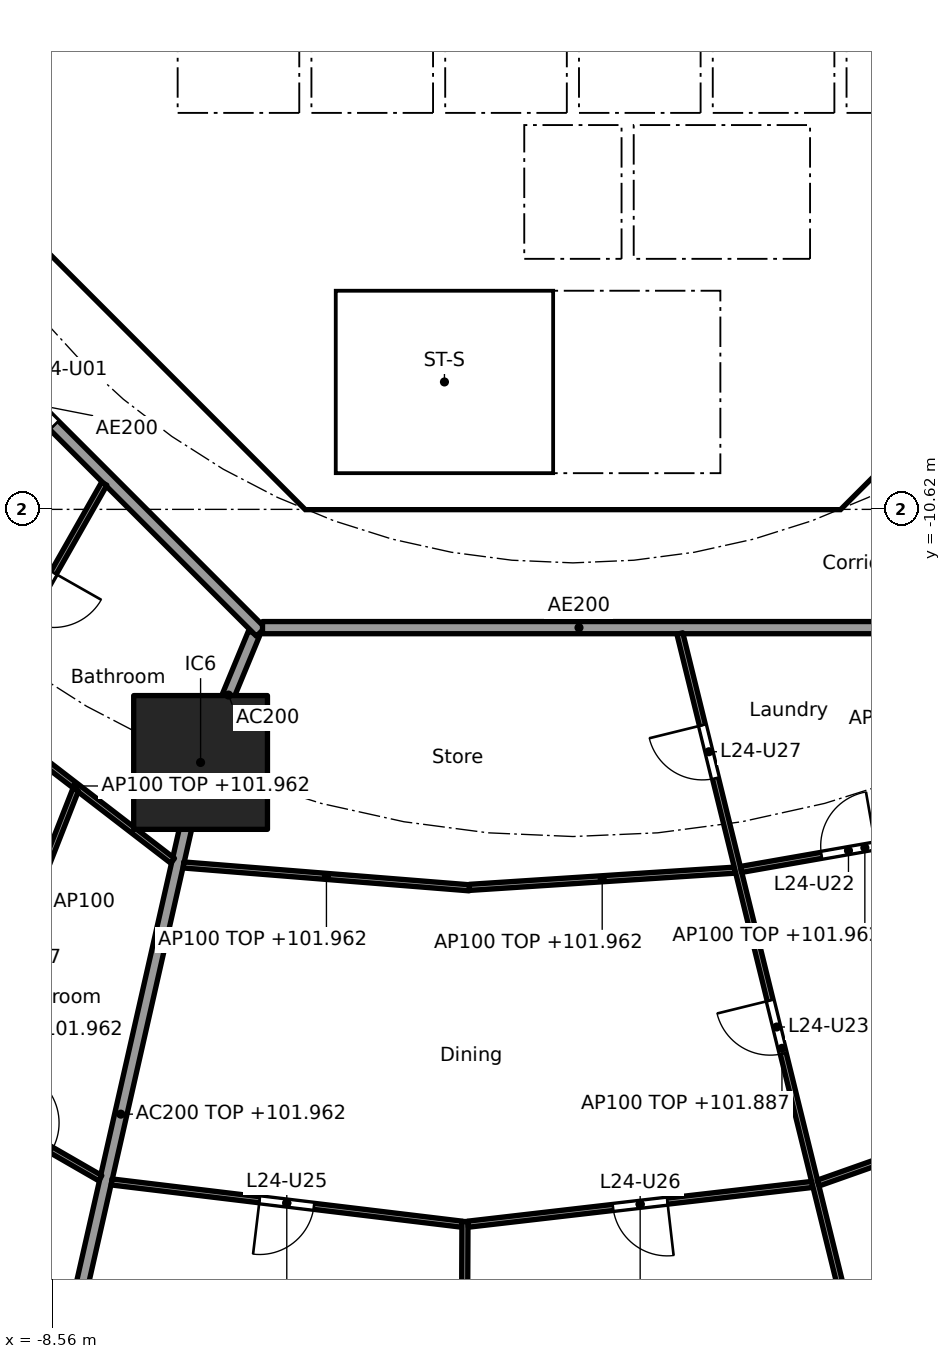
"""IFC4 building model, lengths in metres.
Left out: names, types, materials, properties, quantities, classifications, styles, units other than length and angle.
Written with IfcOpenShell. Run it as: python <this file> out.ifc"""

import sys

from ifc_helpers import new_model, si_unit, direction, frame, frame_2d, origin, origin_2d, place, context, subcontext, project, spatial, polyline, rectangle, outline, extrude, element, fill, save


model = new_model("IFC4")
c1 = context("Model", 3, precision=1e-05, world=origin(), true_north=direction((0.0, 1.0)))
c2 = subcontext(c1, "Body", "Model", "MODEL_VIEW")
j1 = project(units=[si_unit("LENGTHUNIT", "METRE"), si_unit("PLANEANGLEUNIT", "RADIAN")], contexts=[c1])
p1 = place(None, origin())
s1 = spatial("IfcSite", under=j1, at=p1, CompositionType="ELEMENT")
p2 = place(p1, origin())
s2 = spatial("IfcBuilding", under=s1, at=p2, CompositionType="ELEMENT")
p3 = place(p2, frame((0.0, 0.0, 99.2)))
s3 = spatial("IfcBuildingStorey", under=s2, at=p3, CompositionType="ELEMENT", Elevation=99.2)
p4 = place(p3, frame((-6.123, -14.782, 0.0), z_axis=(0.0, 0.0, 1.0), x_axis=(1.0, 0.0, 0.0)))
e1 = element("IfcColumn", 1, at=p4, inside=s3, PredefinedType="COLUMN", context=c2, shape_type="SweptSolid", body=[
    extrude(rectangle(XDim=2.2, YDim=2.2, at=origin_2d()), origin(), (0.0, 0.0, 1.0), 3.7),
])
p5 = place(p3, frame((-9.988, -4.613, 0.0), z_axis=(0.0, 0.0, 1.0), x_axis=(0.707106781187, -0.707106781187, 0.0)))
e2 = element("IfcWall", 2, at=p5, inside=s3, PredefinedType="SHEAR", context=c2, shape_type="SweptSolid", body=[
    extrude(rectangle(XDim=7.602, YDim=0.6, at=frame_2d((3.801, 0.0))), origin(), (0.0, 0.0, 1.0), 3.44),
])
p6 = place(p5, frame((6.151, 0.0, 0.0)))
e3 = element("IfcOpeningElement", 3, at=p6, cuts=e2, PredefinedType="OPENING", context=c2, shape_type="SweptSolid", body=[
    extrude(rectangle(XDim=1.1, YDim=2.1, at=frame_2d((0.55, 1.05))), frame((0.0, 0.31, 0.0), z_axis=(0.0, -1.0, 0.0), x_axis=(1.0, 0.0, 0.0)), (0.0, 0.0, 1.0), 0.62),
])
p7 = place(p3, frame((4.613, -9.988, 0.0), z_axis=(0.0, 0.0, 1.0), x_axis=(0.707106781187, 0.707106781187, 0.0)))
e4 = element("IfcWall", 4, at=p7, inside=s3, PredefinedType="SHEAR", context=c2, shape_type="SweptSolid", body=[
    extrude(rectangle(XDim=7.602, YDim=0.6, at=frame_2d((3.801, 0.0))), origin(), (0.0, 0.0, 1.0), 3.44),
])
p8 = place(p7, frame((3.201, 0.0, 0.0)))
e5 = element("IfcOpeningElement", 5, at=p8, cuts=e4, PredefinedType="OPENING", context=c2, shape_type="SweptSolid", body=[
    extrude(rectangle(XDim=1.2, YDim=2.1, at=frame_2d((0.6, 1.05))), frame((0.0, 0.31, 0.0), z_axis=(0.0, -1.0, 0.0), x_axis=(1.0, 0.0, 0.0)), (0.0, 0.0, 1.0), 0.62),
])
p9 = place(p3, frame((4.0, -10.025, 0.0), z_axis=(0.0, 0.0, 1.0), x_axis=(0.0, 1.0, 0.0)))
e6 = element("IfcWall", 6, at=p9, inside=s3, PredefinedType="SOLIDWALL", context=c2, shape_type="SweptSolid", body=[
    extrude(rectangle(XDim=3.0, YDim=0.2, at=frame_2d((1.5, 0.0))), origin(), (0.0, 0.0, 1.0), 3.44),
])
p10 = place(p9, frame((0.975, 0.0, 0.0)))
e7 = element("IfcOpeningElement", 7, at=p10, cuts=e6, PredefinedType="OPENING", context=c2, shape_type="SweptSolid", body=[
    extrude(rectangle(XDim=1.1, YDim=2.1, at=frame_2d((0.55, 1.05))), frame((0.0, 0.11, 0.0), z_axis=(0.0, -1.0, 0.0), x_axis=(1.0, 0.0, 0.0)), (0.0, 0.0, 1.0), 0.22),
])
p11 = place(p3, frame((-7.4, -6.627, 0.0), z_axis=(0.0, 0.0, 1.0), x_axis=(0.0, 1.0, 0.0)))
e8 = element("IfcWall", 8, at=p11, inside=s3, PredefinedType="PARTITIONING", context=c2, shape_type="SweptSolid", body=[
    extrude(rectangle(XDim=2.527, YDim=0.15, at=frame_2d((1.263, 0.0))), origin(), (0.0, 0.0, 1.0), 3.44),
])
p12 = place(p11, frame((0.776, 0.0, 0.0)))
e9 = element("IfcOpeningElement", 9, at=p12, cuts=e8, PredefinedType="OPENING", context=c2, shape_type="SweptSolid", body=[
    extrude(rectangle(XDim=0.9, YDim=2.1, at=frame_2d((0.45, 1.05))), frame((0.0, 0.085, 0.0), z_axis=(0.0, -1.0, 0.0), x_axis=(1.0, 0.0, 0.0)), (0.0, 0.0, 1.0), 0.17),
])
p13 = place(p3, frame((4.0, -6.5, 0.0), z_axis=(0.0, 0.0, 1.0), x_axis=(0.0, 1.0, 0.0)))
e10 = element("IfcWall", 10, at=p13, inside=s3, PredefinedType="SOLIDWALL", context=c2, shape_type="SweptSolid", body=[
    extrude(rectangle(XDim=2.2, YDim=0.2, at=frame_2d((1.1, 0.0))), origin(), (0.0, 0.0, 1.0), 3.44),
])
p14 = place(p13, frame((0.55, 0.0, 0.0)))
e11 = element("IfcOpeningElement", 11, at=p14, cuts=e10, PredefinedType="OPENING", context=c2, shape_type="SweptSolid", body=[
    extrude(rectangle(XDim=1.1, YDim=2.1, at=frame_2d((0.55, 1.05))), frame((0.0, 0.11, 0.0), z_axis=(0.0, -1.0, 0.0), x_axis=(1.0, 0.0, 0.0)), (0.0, 0.0, 1.0), 0.22),
])
p15 = place(p3, frame((-4.0, -6.5, 0.0), z_axis=(0.0, 0.0, 1.0), x_axis=(0.0, 1.0, 0.0)))
e12 = element("IfcWall", 12, at=p15, inside=s3, PredefinedType="SOLIDWALL", context=c2, shape_type="SweptSolid", body=[
    extrude(rectangle(XDim=2.2, YDim=0.2, at=frame_2d((1.1, 0.0))), origin(), (0.0, 0.0, 1.0), 3.44),
])
p16 = place(p15, frame((0.65, 0.0, 0.0)))
e13 = element("IfcOpeningElement", 13, at=p16, cuts=e12, PredefinedType="OPENING", context=c2, shape_type="SweptSolid", body=[
    extrude(rectangle(XDim=0.9, YDim=2.1, at=frame_2d((0.45, 1.05))), frame((0.0, 0.11, 0.0), z_axis=(0.0, -1.0, 0.0), x_axis=(1.0, 0.0, 0.0)), (0.0, 0.0, 1.0), 0.22),
])
p17 = place(p3, origin())
e14 = element("IfcWall", 14, at=p17, inside=s3, PredefinedType="SHEAR", context=c2, shape_type="SweptSolid", body=[
    extrude(outline(polyline([(-4.152, -10.025), (4.152, -10.025), (4.401, -9.776), (4.825, -10.2), (4.401, -10.625), (-4.401, -10.625), (-4.825, -10.2), (-4.401, -9.776), (-4.152, -10.025)])), origin(), (0.0, 0.0, 1.0), 3.44),
])
for number, where, z_axis, x_axis in (
    (15, (-0.9, -6.5, 0.0), (0.0, 0.0, 1.0), (0.0, 1.0, 0.0)),
    (16, (0.9, -6.5, 0.0), (0.0, 0.0, 1.0), (0.0, 1.0, 0.0)),
):
    element("IfcWall", number, at=place(p3, frame(where, z_axis=z_axis, x_axis=x_axis)), inside=s3, PredefinedType="SOLIDWALL", context=c2, shape_type="SweptSolid", body=[
        extrude(rectangle(XDim=2.2, YDim=0.2, at=frame_2d((1.1, 0.0))), origin(), (0.0, 0.0, 1.0), 3.44),
    ])
p18 = place(p3, origin())
e17 = element("IfcWall", 17, at=p18, inside=s3, PredefinedType="SOLIDWALL", context=c2, shape_type="SweptSolid", body=[
    extrude(outline(polyline([(-6.7, -2.1), (-6.5, -2.1), (-6.5, -4.1), (-4.5, -4.1), (-4.5, -2.1), (-4.3, -2.1), (-4.3, -4.1), (-2.3, -4.1), (-2.3, -2.1), (-2.1, -2.1), (-2.1, -4.1), (-0.1, -4.1), (-0.1, -2.1), (0.1, -2.1), (0.1, -4.1), (2.1, -4.1), (2.1, -2.1), (2.3, -2.1), (2.3, -4.1), (4.3, -4.1), (4.3, -2.1), (4.5, -2.1), (4.5, -4.1), (6.5, -4.1), (6.5, -2.1), (6.7, -2.1), (6.7, -4.3), (-6.7, -4.3), (-6.7, -2.1)])), origin(), (0.0, 0.0, 1.0), 3.44),
])
p19 = place(p3, frame((-10.025, -4.0, 0.0), z_axis=(0.0, 0.0, 1.0), x_axis=(1.0, 0.0, 0.0)))
e18 = element("IfcWall", 18, at=p19, inside=s3, PredefinedType="PARTITIONING", context=c2, shape_type="SweptSolid", body=[
    extrude(rectangle(XDim=3.325, YDim=0.2, at=frame_2d((1.662, 0.0))), origin(), (0.0, 0.0, 1.0), 3.44),
])
p20 = place(p3, origin())
e19 = element("IfcWall", 19, at=p20, inside=s3, PredefinedType="SOLIDWALL", context=c2, shape_type="SweptSolid", body=[
    extrude(outline(polyline([(-3.9, -10.025), (-4.1, -10.025), (-4.1, -7.025), (-3.9, -7.025), (-3.9, -10.025)])), origin(), (0.0, 0.0, 1.0), 3.44),
])
p21 = place(p3, origin())
e20 = element("IfcWall", 20, at=p21, inside=s3, PredefinedType="SOLIDWALL", context=c2, shape_type="SweptSolid", body=[
    extrude(outline(polyline([(4.1, -7.025), (-4.1, -7.025), (-4.1, -6.5), (4.1, -6.5), (4.1, -7.025)])), origin(), (0.0, 0.0, 1.0), 3.44),
])
p22 = place(p3, frame((-5.243, -12.657, 0.0), z_axis=(0.0, 0.0, 1.0), x_axis=(-0.382668627144, -0.923885664896, 0.0)))
e21 = element("IfcWall", 21, at=p22, inside=s3, PredefinedType="PARTITIONING", context=c2, shape_type="SweptSolid", body=[
    extrude(rectangle(XDim=2.2, YDim=0.2, at=frame_2d((1.1, 0.0))), origin(), (0.0, 0.0, 1.0), 3.44),
])
p23 = place(p3, frame((-6.134, -14.831, 0.0), z_axis=(0.0, 0.0, 1.0), x_axis=(-0.221225405869, -0.975222702667, 0.0)))
e22 = element("IfcWall", 22, at=p23, inside=s3, PredefinedType="PARTITIONING", context=c2, shape_type="SweptSolid", body=[
    extrude(rectangle(XDim=11.761, YDim=0.2, at=frame_2d((5.88, 0.0))), origin(), (0.0, 0.0, 1.0), 2.762),
])
p24 = place(p3, frame((-12.635, -5.134, 0.0), z_axis=(0.0, 0.0, 1.0), x_axis=(0.707106781187, -0.707106781187, 0.0)))
e23 = element("IfcWall", 23, at=p24, inside=s3, PredefinedType="PARTITIONING", context=c2, shape_type="SweptSolid", body=[
    extrude(rectangle(XDim=10.609, YDim=0.2, at=frame_2d((5.305, 0.0))), origin(), (0.0, 0.0, 1.0), 3.44),
])
p25 = place(p24, frame((4.804, 0.0, 0.0)))
e24 = element("IfcOpeningElement", 24, at=p25, cuts=e23, PredefinedType="OPENING", context=c2, shape_type="SweptSolid", body=[
    extrude(rectangle(XDim=1.0, YDim=2.1, at=frame_2d((0.5, 1.05))), frame((0.0, 0.11, 0.0), z_axis=(0.0, -1.0, 0.0), x_axis=(1.0, 0.0, 0.0)), (0.0, 0.0, 1.0), 0.22),
])
p26 = place(p3, frame((-5.104, -12.565, 0.0), z_axis=(0.0, 0.0, 1.0), x_axis=(1.0, 0.0, 0.0)))
e25 = element("IfcWall", 25, at=p26, inside=s3, PredefinedType="PARTITIONING", context=c2, shape_type="SweptSolid", body=[
    extrude(rectangle(XDim=10.409, YDim=0.2, at=frame_2d((5.205, 0.0))), origin(), (0.0, 0.0, 1.0), 3.44),
])
p27 = place(p3, frame((-7.707, -10.198, 0.0), z_axis=(0.0, 0.0, 1.0), x_axis=(-0.49395524734, -0.869487328042, 0.0)))
e26 = element("IfcWall", 26, at=p27, inside=s3, PredefinedType="PARTITIONING", context=c2, shape_type="SweptSolid", body=[
    extrude(rectangle(XDim=15.025, YDim=0.1, at=frame_2d((7.512, 0.0))), origin(), (0.0, 0.0, 1.0), 2.687),
])
p28 = place(p27, frame((1.684, 0.0, 0.0)))
e27 = element("IfcOpeningElement", 27, at=p28, cuts=e26, PredefinedType="OPENING", context=c2, shape_type="SweptSolid", body=[
    extrude(rectangle(XDim=0.9, YDim=2.1, at=frame_2d((0.45, 1.05))), frame((0.0, 0.06, 0.0), z_axis=(0.0, -1.0, 0.0), x_axis=(1.0, 0.0, 0.0)), (0.0, 0.0, 1.0), 0.12),
])
p29 = place(p27, frame((6.648, 0.0, 0.0)))
e28 = element("IfcOpeningElement", 28, at=p29, cuts=e26, PredefinedType="OPENING", context=c2, shape_type="SweptSolid", body=[
    extrude(rectangle(XDim=0.9, YDim=2.1, at=frame_2d((0.45, 1.05))), frame((0.0, 0.06, 0.0), z_axis=(0.0, -1.0, 0.0), x_axis=(1.0, 0.0, 0.0)), (0.0, 0.0, 1.0), 0.12),
])
p30 = place(p27, frame((12.027, 0.0, 0.0)))
e29 = element("IfcOpeningElement", 29, at=p30, cuts=e26, PredefinedType="OPENING", context=c2, shape_type="SweptSolid", body=[
    extrude(rectangle(XDim=0.9, YDim=2.1, at=frame_2d((0.45, 1.05))), frame((0.0, 0.06, 0.0), z_axis=(0.0, -1.0, 0.0), x_axis=(1.0, 0.0, 0.0)), (0.0, 0.0, 1.0), 0.12),
])
p31 = place(p3, frame((-9.775, -13.939, 0.0), z_axis=(0.0, 0.0, 1.0), x_axis=(0.792162117554, -0.610310723741, 0.0)))
e30 = element("IfcWall", 30, at=p31, inside=s3, PredefinedType="PARTITIONING", context=c2, shape_type="SweptSolid", body=[
    extrude(rectangle(XDim=4.03, YDim=0.1, at=frame_2d((2.015, 0.0))), origin(), (0.0, 0.0, 1.0), 2.762),
])
p32 = place(p3, frame((-12.568, -18.856, 0.0), z_axis=(0.0, 0.0, 1.0), x_axis=(0.866533437451, -0.499119025664, 0.0)))
e31 = element("IfcWall", 31, at=p32, inside=s3, PredefinedType="PARTITIONING", context=c2, shape_type="SweptSolid", body=[
    extrude(rectangle(XDim=5.535, YDim=0.1, at=frame_2d((2.768, 0.0))), origin(), (0.0, 0.0, 1.0), 2.762),
])
p33 = place(p32, frame((3.714, 0.0, 0.0)))
e32 = element("IfcOpeningElement", 32, at=p33, cuts=e31, PredefinedType="OPENING", context=c2, shape_type="SweptSolid", body=[
    extrude(rectangle(XDim=0.9, YDim=2.1, at=frame_2d((0.45, 1.05))), frame((0.0, 0.06, 0.0), z_axis=(0.0, -1.0, 0.0), x_axis=(1.0, 0.0, 0.0)), (0.0, 0.0, 1.0), 0.12),
])
p34 = place(p3, frame((-8.177, -15.231, 0.0), z_axis=(0.0, 0.0, 1.0), x_axis=(-0.365520869553, -0.930803144559, 0.0)))
e33 = element("IfcWall", 33, at=p34, inside=s3, PredefinedType="PARTITIONING", context=c2, shape_type="SweptSolid", body=[
    extrude(rectangle(XDim=5.342, YDim=0.1, at=frame_2d((2.671, 0.0))), origin(), (0.0, 0.0, 1.0), 3.44),
])
p35 = place(p3, frame((-6.404, -16.468, 0.0), z_axis=(0.0, 0.0, 1.0), x_axis=(0.996817253426, -0.079720532316, 0.0)))
e34 = element("IfcWall", 34, at=p35, inside=s3, PredefinedType="PARTITIONING", context=c2, shape_type="SweptSolid", body=[
    extrude(rectangle(XDim=4.716, YDim=0.1, at=frame_2d((2.358, 0.0))), origin(), (0.0, 0.0, 1.0), 2.762),
])
p36 = place(p3, frame((-7.586, -21.68, 0.0), z_axis=(0.0, 0.0, 1.0), x_axis=(0.992810189026, -0.119699325668, 0.0)))
e35 = element("IfcWall", 35, at=p36, inside=s3, PredefinedType="PARTITIONING", context=c2, shape_type="SweptSolid", body=[
    extrude(rectangle(XDim=5.803, YDim=0.1, at=frame_2d((2.901, 0.0))), origin(), (0.0, 0.0, 1.0), 2.762),
])
p37 = place(p36, frame((2.451, 0.0, 0.0)))
e36 = element("IfcOpeningElement", 36, at=p37, cuts=e35, PredefinedType="OPENING", context=c2, shape_type="SweptSolid", body=[
    extrude(rectangle(XDim=0.9, YDim=2.1, at=frame_2d((0.45, 1.05))), frame((0.0, 0.06, 0.0), z_axis=(0.0, -1.0, 0.0), x_axis=(1.0, 0.0, 0.0)), (0.0, 0.0, 1.0), 0.12),
])
p38 = place(p3, frame((-1.703, -16.836, 0.0), z_axis=(0.0, 0.0, 1.0), x_axis=(0.997897941075, 0.064805086209, 0.0)))
e37 = element("IfcWall", 37, at=p38, inside=s3, PredefinedType="PARTITIONING", context=c2, shape_type="SweptSolid", body=[
    extrude(rectangle(XDim=4.378, YDim=0.1, at=frame_2d((2.189, 0.0))), origin(), (0.0, 0.0, 1.0), 2.762),
])
p39 = place(p3, frame((-1.775, -22.331, 0.0), z_axis=(0.0, 0.0, 1.0), x_axis=(-0.004088153894, -0.999991643464, 0.0)))
e38 = element("IfcWall", 38, at=p39, inside=s3, PredefinedType="PARTITIONING", context=c2, shape_type="SweptSolid", body=[
    extrude(rectangle(XDim=5.016, YDim=0.1, at=frame_2d((2.508, 0.0))), origin(), (0.0, 0.0, 1.0), 2.762),
])
p40 = place(p3, frame((-1.726, -22.375, 0.0), z_axis=(0.0, 0.0, 1.0), x_axis=(0.99339223329, 0.114768771187, 0.0)))
e39 = element("IfcWall", 39, at=p40, inside=s3, PredefinedType="PARTITIONING", context=c2, shape_type="SweptSolid", body=[
    extrude(rectangle(XDim=5.701, YDim=0.1, at=frame_2d((2.851, 0.0))), origin(), (0.0, 0.0, 1.0), 2.762),
])
p41 = place(p40, frame((2.4, 0.0, 0.0)))
e40 = element("IfcOpeningElement", 40, at=p41, cuts=e39, PredefinedType="OPENING", context=c2, shape_type="SweptSolid", body=[
    extrude(rectangle(XDim=0.9, YDim=2.1, at=frame_2d((0.45, 1.05))), frame((0.0, 0.06, 0.0), z_axis=(0.0, -1.0, 0.0), x_axis=(1.0, 0.0, 0.0)), (0.0, 0.0, 1.0), 0.12),
])
p42 = place(p3, frame((1.759, -12.662, 0.0), z_axis=(0.0, 0.0, 1.0), x_axis=(0.239021819854, -0.971014196412, 0.0)))
e41 = element("IfcWall", 41, at=p42, inside=s3, PredefinedType="PARTITIONING", context=c2, shape_type="SweptSolid", body=[
    extrude(rectangle(XDim=14.05, YDim=0.1, at=frame_2d((7.025, 0.0))), origin(), (0.0, 0.0, 1.0), 2.687),
])
p43 = place(p42, frame((6.214, 0.0, 0.0)))
e42 = element("IfcOpeningElement", 42, at=p43, cuts=e41, PredefinedType="OPENING", context=c2, shape_type="SweptSolid", body=[
    extrude(rectangle(XDim=0.9, YDim=2.1, at=frame_2d((0.45, 1.05))), frame((0.0, 0.06, 0.0), z_axis=(0.0, -1.0, 0.0), x_axis=(1.0, 0.0, 0.0)), (0.0, 0.0, 1.0), 0.12),
])
p44 = place(p42, frame((1.552, 0.0, 0.0)))
e43 = element("IfcOpeningElement", 43, at=p44, cuts=e41, PredefinedType="OPENING", context=c2, shape_type="SweptSolid", body=[
    extrude(rectangle(XDim=0.9, YDim=2.1, at=frame_2d((0.45, 1.05))), frame((0.0, 0.06, 0.0), z_axis=(0.0, -1.0, 0.0), x_axis=(1.0, 0.0, 0.0)), (0.0, 0.0, 1.0), 0.12),
])
p45 = place(p3, frame((2.765, -16.541, 0.0), z_axis=(0.0, 0.0, 1.0), x_axis=(0.984998612286, 0.172562260633, 0.0)))
e44 = element("IfcWall", 44, at=p45, inside=s3, PredefinedType="PARTITIONING", context=c2, shape_type="SweptSolid", body=[
    extrude(rectangle(XDim=4.134, YDim=0.1, at=frame_2d((2.067, 0.0))), origin(), (0.0, 0.0, 1.0), 2.762),
])
p46 = place(p45, frame((1.344, 0.0, 0.0)))
e45 = element("IfcOpeningElement", 45, at=p46, cuts=e44, PredefinedType="OPENING", context=c2, shape_type="SweptSolid", body=[
    extrude(rectangle(XDim=0.9, YDim=2.1, at=frame_2d((0.45, 1.05))), frame((0.0, 0.06, 0.0), z_axis=(0.0, -1.0, 0.0), x_axis=(1.0, 0.0, 0.0)), (0.0, 0.0, 1.0), 0.12),
])
p47 = place(p3, frame((4.034, -21.698, 0.0), z_axis=(0.0, 0.0, 1.0), x_axis=(0.942864271692, 0.333177077794, 0.0)))
e46 = element("IfcWall", 46, at=p47, inside=s3, PredefinedType="PARTITIONING", context=c2, shape_type="SweptSolid", body=[
    extrude(rectangle(XDim=5.545, YDim=0.1, at=frame_2d((2.772, 0.0))), origin(), (0.0, 0.0, 1.0), 2.762),
])
p48 = place(p14, origin())
e47 = element("IfcDoor", 47, at=p48, inside=s3, OperationType="DOUBLE_DOOR_SLIDING", PredefinedType="DOOR", context=c2, shape_type="SweptSolid", body=[
    extrude(rectangle(XDim=1.1, YDim=2.1, at=frame_2d((0.55, 1.05))), frame((0.0, 0.025, 0.0), z_axis=(0.0, -1.0, 0.0), x_axis=(1.0, 0.0, 0.0)), (0.0, 0.0, 1.0), 0.05),
])
fill(e11, e47)
p49 = place(p10, origin())
e48 = element("IfcDoor", 48, at=p49, inside=s3, OperationType="SINGLE_SWING_LEFT", PredefinedType="DOOR", context=c2, shape_type="SweptSolid", body=[
    extrude(rectangle(XDim=1.1, YDim=2.1, at=frame_2d((0.55, 1.05))), frame((0.0, 0.025, 0.0), z_axis=(0.0, -1.0, 0.0), x_axis=(1.0, 0.0, 0.0)), (0.0, 0.0, 1.0), 0.05),
])
fill(e7, e48)
p50 = place(p12, origin())
e49 = element("IfcDoor", 49, at=p50, inside=s3, OperationType="SINGLE_SWING_LEFT", PredefinedType="DOOR", context=c2, shape_type="SweptSolid", body=[
    extrude(rectangle(XDim=0.9, YDim=2.1, at=frame_2d((0.45, 1.05))), frame((0.0, 0.025, 0.0), z_axis=(0.0, -1.0, 0.0), x_axis=(1.0, 0.0, 0.0)), (0.0, 0.0, 1.0), 0.05),
])
fill(e9, e49)
p51 = place(p16, frame((0.9, 0.0, 0.0), x_axis=(-1.0, 0.0, 0.0)))
e50 = element("IfcDoor", 50, at=p51, inside=s3, OperationType="SINGLE_SWING_LEFT", PredefinedType="DOOR", context=c2, shape_type="SweptSolid", body=[
    extrude(rectangle(XDim=0.9, YDim=2.1, at=frame_2d((0.45, 1.05))), frame((0.0, 0.025, 0.0), z_axis=(0.0, -1.0, 0.0), x_axis=(1.0, 0.0, 0.0)), (0.0, 0.0, 1.0), 0.05),
])
fill(e13, e50)
p52 = place(p6, origin())
e51 = element("IfcDoor", 51, at=p52, inside=s3, OperationType="SINGLE_SWING_LEFT", PredefinedType="DOOR", context=c2, shape_type="SweptSolid", body=[
    extrude(rectangle(XDim=1.1, YDim=2.1, at=frame_2d((0.55, 1.05))), frame((0.0, 0.025, 0.0), z_axis=(0.0, -1.0, 0.0), x_axis=(1.0, 0.0, 0.0)), (0.0, 0.0, 1.0), 0.05),
])
fill(e3, e51)
p53 = place(p25, frame((1.0, 0.0, 0.0), x_axis=(-1.0, 0.0, 0.0)))
e52 = element("IfcDoor", 52, at=p53, inside=s3, OperationType="SINGLE_SWING_RIGHT", PredefinedType="DOOR", context=c2, shape_type="SweptSolid", body=[
    extrude(rectangle(XDim=1.0, YDim=2.1, at=frame_2d((0.5, 1.05))), frame((0.0, 0.025, 0.0), z_axis=(0.0, -1.0, 0.0), x_axis=(1.0, 0.0, 0.0)), (0.0, 0.0, 1.0), 0.05),
])
fill(e24, e52)
p54 = place(p28, origin())
e53 = element("IfcDoor", 53, at=p54, inside=s3, OperationType="SINGLE_SWING_LEFT", PredefinedType="DOOR", context=c2, shape_type="SweptSolid", body=[
    extrude(rectangle(XDim=0.9, YDim=2.1, at=frame_2d((0.45, 1.05))), frame((0.0, 0.025, 0.0), z_axis=(0.0, -1.0, 0.0), x_axis=(1.0, 0.0, 0.0)), (0.0, 0.0, 1.0), 0.05),
])
fill(e27, e53)
p55 = place(p33, origin())
e54 = element("IfcDoor", 54, at=p55, inside=s3, OperationType="SINGLE_SWING_LEFT", PredefinedType="DOOR", context=c2, shape_type="SweptSolid", body=[
    extrude(rectangle(XDim=0.9, YDim=2.1, at=frame_2d((0.45, 1.05))), frame((0.0, 0.025, 0.0), z_axis=(0.0, -1.0, 0.0), x_axis=(1.0, 0.0, 0.0)), (0.0, 0.0, 1.0), 0.05),
])
fill(e32, e54)
p56 = place(p46, origin())
e55 = element("IfcDoor", 55, at=p56, inside=s3, OperationType="SINGLE_SWING_RIGHT", PredefinedType="DOOR", context=c2, shape_type="SweptSolid", body=[
    extrude(rectangle(XDim=0.9, YDim=2.1, at=frame_2d((0.45, 1.05))), frame((0.0, 0.025, 0.0), z_axis=(0.0, -1.0, 0.0), x_axis=(1.0, 0.0, 0.0)), (0.0, 0.0, 1.0), 0.05),
])
fill(e45, e55)
p57 = place(p43, frame((0.9, 0.0, 0.0), x_axis=(-1.0, 0.0, 0.0)))
e56 = element("IfcDoor", 56, at=p57, inside=s3, OperationType="SINGLE_SWING_RIGHT", PredefinedType="DOOR", context=c2, shape_type="SweptSolid", body=[
    extrude(rectangle(XDim=0.9, YDim=2.1, at=frame_2d((0.45, 1.05))), frame((0.0, 0.025, 0.0), z_axis=(0.0, -1.0, 0.0), x_axis=(1.0, 0.0, 0.0)), (0.0, 0.0, 1.0), 0.05),
])
fill(e42, e56)
p58 = place(p37, frame((0.9, 0.0, 0.0), x_axis=(-1.0, 0.0, 0.0)))
e57 = element("IfcDoor", 57, at=p58, inside=s3, OperationType="SINGLE_SWING_RIGHT", PredefinedType="DOOR", context=c2, shape_type="SweptSolid", body=[
    extrude(rectangle(XDim=0.9, YDim=2.1, at=frame_2d((0.45, 1.05))), frame((0.0, 0.025, 0.0), z_axis=(0.0, -1.0, 0.0), x_axis=(1.0, 0.0, 0.0)), (0.0, 0.0, 1.0), 0.05),
])
fill(e36, e57)
p59 = place(p41, frame((0.9, 0.0, 0.0), x_axis=(-1.0, 0.0, 0.0)))
e58 = element("IfcDoor", 58, at=p59, inside=s3, OperationType="SINGLE_SWING_LEFT", PredefinedType="DOOR", context=c2, shape_type="SweptSolid", body=[
    extrude(rectangle(XDim=0.9, YDim=2.1, at=frame_2d((0.45, 1.05))), frame((0.0, 0.025, 0.0), z_axis=(0.0, -1.0, 0.0), x_axis=(1.0, 0.0, 0.0)), (0.0, 0.0, 1.0), 0.05),
])
fill(e40, e58)
p60 = place(p44, frame((0.9, 0.0, 0.0), x_axis=(-1.0, 0.0, 0.0)))
e59 = element("IfcDoor", 59, at=p60, inside=s3, OperationType="SINGLE_SWING_RIGHT", PredefinedType="DOOR", context=c2, shape_type="SweptSolid", body=[
    extrude(rectangle(XDim=0.9, YDim=2.1, at=frame_2d((0.45, 1.05))), frame((0.0, 0.025, 0.0), z_axis=(0.0, -1.0, 0.0), x_axis=(1.0, 0.0, 0.0)), (0.0, 0.0, 1.0), 0.05),
])
fill(e43, e59)
save(model, sys.argv[1])
